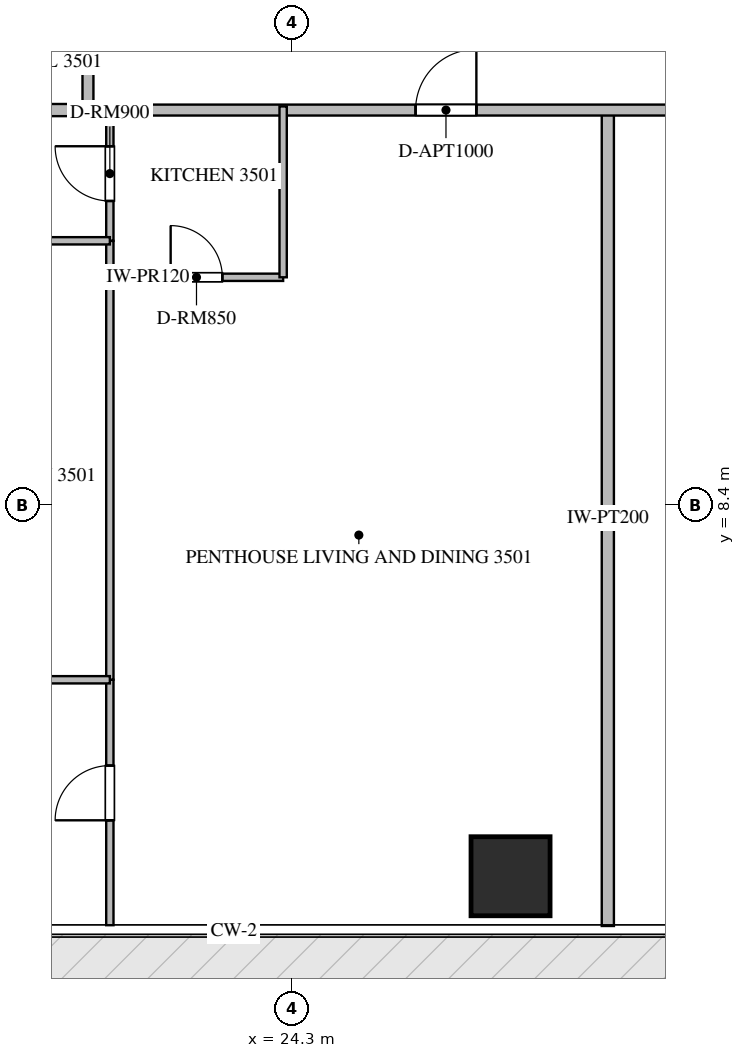
"""IFC4 building model, lengths in metres.
Left out: names, types, materials, properties, quantities, classifications, styles, units other than length and angle.
Written with IfcOpenShell. Run it as: python <this file> out.ifc"""

import sys

from ifc_helpers import new_model, si_unit, direction, frame, frame_2d, origin, origin_2d, place, context, subcontext, project, spatial, rectangle, extrude, source, transform, mapped, element, fill, save


model = new_model("IFC4")
c1 = context("Model", 3, precision=1e-05, world=origin(), true_north=direction((0.0, 1.0)))
c2 = subcontext(c1, "Body", "Model", "MODEL_VIEW")
j1 = project(units=[si_unit("LENGTHUNIT", "METRE"), si_unit("PLANEANGLEUNIT", "RADIAN")], contexts=[c1])
p1 = place(None, origin())
s1 = spatial("IfcSite", under=j1, at=p1, CompositionType="ELEMENT")
p2 = place(p1, origin())
s2 = spatial("IfcBuilding", under=s1, at=p2, CompositionType="ELEMENT")
p3 = place(p2, frame((0.0, 0.0, 142.65)))
s3 = spatial("IfcBuildingStorey", under=s2, at=p3, CompositionType="ELEMENT", Elevation=142.65)
m1 = source(origin(), c2, "Body", "SweptSolid", [
    extrude(rectangle(XDim=1.3, YDim=1.3, at=origin_2d()), origin(), (0.0, 0.0, 1.0), 3.75),
])
p4 = place(p3, frame((27.9, 2.3, -0.26), z_axis=(0.0, 0.0, 1.0), x_axis=(1.0, 0.0, 0.0)))
e1 = element("IfcColumn", 1, at=p4, inside=s3, PredefinedType="COLUMN", context=c2, shape_type="MappedRepresentation", body=[
    mapped(m1, transform((0.0, 0.0, 0.0), scale=1.0)),
])
p5 = place(p3, frame((29.5, 1.482, 0.0), z_axis=(0.0, 0.0, 1.0), x_axis=(0.0, 1.0, 0.0)))
e2 = element("IfcWall", 2, at=p5, inside=s3, PredefinedType="PARTITIONING", context=c2, shape_type="SweptSolid", body=[
    extrude(rectangle(XDim=13.418, YDim=0.2, at=frame_2d((6.709, 0.0))), origin(), (0.0, 0.0, 1.0), 3.49),
])
p6 = place(p3, frame((7.882, 14.9, 0.0), z_axis=(0.0, 0.0, 1.0), x_axis=(1.0, 0.0, 0.0)))
e3 = element("IfcWall", 3, at=p6, inside=s3, PredefinedType="PARTITIONING", context=c2, shape_type="SweptSolid", body=[
    extrude(rectangle(XDim=13.068, YDim=0.2, at=frame_2d((6.534, 0.0))), origin(), (0.0, 0.0, 1.0), 3.49),
])
p7 = place(p3, frame((20.952, 14.9, 0.0), z_axis=(0.0, 0.0, 1.0), x_axis=(1.0, 0.0, 0.0)))
e4 = element("IfcWall", 4, at=p7, inside=s3, PredefinedType="PARTITIONING", context=c2, shape_type="SweptSolid", body=[
    extrude(rectangle(XDim=22.896, YDim=0.18, at=frame_2d((11.448, 0.0))), origin(), (0.0, 0.0, 1.0), 3.49),
])
p8 = place(p7, frame((5.386, 0.0, 0.0)))
e5 = element("IfcOpeningElement", 5, at=p8, cuts=e4, PredefinedType="OPENING", context=c2, shape_type="SweptSolid", body=[
    extrude(rectangle(XDim=1.0, YDim=2.15, at=frame_2d((0.5, 1.075))), frame((0.0, 0.1, 0.0), z_axis=(0.0, -1.0, 0.0), x_axis=(1.0, 0.0, 0.0)), (0.0, 0.0, 1.0), 0.2),
])
p9 = place(p7, frame((10.948, 0.0, 0.0)))
e6 = element("IfcOpeningElement", 6, at=p9, cuts=e4, PredefinedType="OPENING", context=c2, shape_type="SweptSolid", body=[
    extrude(rectangle(XDim=1.0, YDim=2.15, at=frame_2d((0.5, 1.075))), frame((0.0, 0.1, 0.0), z_axis=(0.0, -1.0, 0.0), x_axis=(1.0, 0.0, 0.0)), (0.0, 0.0, 1.0), 0.2),
])
p10 = place(p3, frame((20.95, 14.9, 0.0), z_axis=(0.0, 0.0, 1.0), x_axis=(0.0, 1.0, 0.0)))
e7 = element("IfcWall", 7, at=p10, inside=s3, PredefinedType="PARTITIONING", context=c2, shape_type="SweptSolid", body=[
    extrude(rectangle(XDim=18.7, YDim=0.18, at=frame_2d((9.35, 0.0))), origin(), (0.0, 0.0, 1.0), 3.49),
])
p11 = place(p10, frame((5.328, 0.0, 0.0)))
e8 = element("IfcOpeningElement", 8, at=p11, cuts=e7, PredefinedType="OPENING", context=c2, shape_type="SweptSolid", body=[
    extrude(rectangle(XDim=1.0, YDim=2.15, at=frame_2d((0.5, 1.075))), frame((0.0, 0.1, 0.0), z_axis=(0.0, -1.0, 0.0), x_axis=(1.0, 0.0, 0.0)), (0.0, 0.0, 1.0), 0.2),
])
p12 = place(p10, frame((15.257, 0.0, 0.0)))
e9 = element("IfcOpeningElement", 9, at=p12, cuts=e7, PredefinedType="OPENING", context=c2, shape_type="SweptSolid", body=[
    extrude(rectangle(XDim=1.0, YDim=2.15, at=frame_2d((0.5, 1.075))), frame((0.0, 0.1, 0.0), z_axis=(0.0, -1.0, 0.0), x_axis=(1.0, 0.0, 0.0)), (0.0, 0.0, 1.0), 0.2),
])
p13 = place(p3, frame((21.31, 12.15, 0.0), z_axis=(0.0, 0.0, 1.0), x_axis=(1.0, 0.0, 0.0)))
e10 = element("IfcWall", 10, at=p13, inside=s3, PredefinedType="PARTITIONING", context=c2, shape_type="SweptSolid", body=[
    extrude(rectangle(XDim=2.85, YDim=0.12, at=frame_2d((1.425, 0.0))), origin(), (0.0, 0.0, 1.0), 3.49),
])
p14 = place(p13, frame((1.0, 0.0, 0.0)))
e11 = element("IfcOpeningElement", 11, at=p14, cuts=e10, PredefinedType="OPENING", context=c2, shape_type="SweptSolid", body=[
    extrude(rectangle(XDim=0.85, YDim=2.1, at=frame_2d((0.425, 1.05))), frame((0.0, 0.07, 0.0), z_axis=(0.0, -1.0, 0.0), x_axis=(1.0, 0.0, 0.0)), (0.0, 0.0, 1.0), 0.14),
])
p15 = place(p3, frame((24.16, 12.15, 0.0), z_axis=(0.0, 0.0, 1.0), x_axis=(0.0, 1.0, 0.0)))
e12 = element("IfcWall", 12, at=p15, inside=s3, PredefinedType="PARTITIONING", context=c2, shape_type="SweptSolid", body=[
    extrude(rectangle(XDim=2.81, YDim=0.12, at=frame_2d((1.405, 0.0))), origin(), (0.0, 0.0, 1.0), 3.49),
])
p16 = place(p3, frame((21.31, 12.75, 0.0), z_axis=(0.0, 0.0, 1.0), x_axis=(0.0, 1.0, 0.0)))
e13 = element("IfcWall", 13, at=p16, inside=s3, PredefinedType="PARTITIONING", context=c2, shape_type="SweptSolid", body=[
    extrude(rectangle(XDim=2.21, YDim=0.12, at=frame_2d((1.105, 0.0))), origin(), (0.0, 0.0, 1.0), 3.49),
])
p17 = place(p16, frame((0.655, 0.0, 0.0)))
e14 = element("IfcOpeningElement", 14, at=p17, cuts=e13, PredefinedType="OPENING", context=c2, shape_type="SweptSolid", body=[
    extrude(rectangle(XDim=0.9, YDim=2.1, at=frame_2d((0.45, 1.05))), frame((0.0, 0.07, 0.0), z_axis=(0.0, -1.0, 0.0), x_axis=(1.0, 0.0, 0.0)), (0.0, 0.0, 1.0), 0.14),
])
p18 = place(p3, frame((21.31, 1.495, 0.0), z_axis=(0.0, 0.0, 1.0), x_axis=(0.0, 1.0, 0.0)))
e15 = element("IfcWall", 15, at=p18, inside=s3, PredefinedType="PARTITIONING", context=c2, shape_type="SweptSolid", body=[
    extrude(rectangle(XDim=4.036, YDim=0.12, at=frame_2d((2.018, 0.0))), origin(), (0.0, 0.0, 1.0), 3.49),
])
p19 = place(p18, frame((1.725, 0.0, 0.0)))
e16 = element("IfcOpeningElement", 16, at=p19, cuts=e15, PredefinedType="OPENING", context=c2, shape_type="SweptSolid", body=[
    extrude(rectangle(XDim=0.9, YDim=2.1, at=frame_2d((0.45, 1.05))), frame((0.0, 0.07, 0.0), z_axis=(0.0, -1.0, 0.0), x_axis=(1.0, 0.0, 0.0)), (0.0, 0.0, 1.0), 0.14),
])
p20 = place(p3, frame((21.31, 5.533, 0.0), z_axis=(0.0, 0.0, 1.0), x_axis=(0.0, 1.0, 0.0)))
e17 = element("IfcWall", 17, at=p20, inside=s3, PredefinedType="PARTITIONING", context=c2, shape_type="SweptSolid", body=[
    extrude(rectangle(XDim=7.215, YDim=0.12, at=frame_2d((3.607, 0.0))), origin(), (0.0, 0.0, 1.0), 3.49),
])
p21 = place(p3, frame((16.25, 5.531, 0.0), z_axis=(0.0, 0.0, 1.0), x_axis=(1.0, 0.0, 0.0)))
e18 = element("IfcWall", 18, at=p21, inside=s3, PredefinedType="PARTITIONING", context=c2, shape_type="SweptSolid", body=[
    extrude(rectangle(XDim=5.06, YDim=0.12, at=frame_2d((2.53, 0.0))), origin(), (0.0, 0.0, 1.0), 3.49),
])
p22 = place(p3, frame((18.352, 12.75, 0.0), z_axis=(0.0, 0.0, 1.0), x_axis=(1.0, 0.0, 0.0)))
e19 = element("IfcWall", 19, at=p22, inside=s3, PredefinedType="PARTITIONING", context=c2, shape_type="SweptSolid", body=[
    extrude(rectangle(XDim=2.958, YDim=0.12, at=frame_2d((1.479, 0.0))), origin(), (0.0, 0.0, 1.0), 3.49),
])
p23 = place(p22, frame((1.054, 0.0, 0.0)))
e20 = element("IfcOpeningElement", 20, at=p23, cuts=e19, PredefinedType="OPENING", context=c2, shape_type="SweptSolid", body=[
    extrude(rectangle(XDim=0.85, YDim=2.1, at=frame_2d((0.425, 1.05))), frame((0.0, 0.07, 0.0), z_axis=(0.0, -1.0, 0.0), x_axis=(1.0, 0.0, 0.0)), (0.0, 0.0, 1.0), 0.14),
])
m2 = source(origin(), c2, "Body", "SweptSolid", [
    extrude(rectangle(XDim=1.0, YDim=2.15, at=frame_2d((0.5, 1.075))), frame((0.0, 0.025, 0.0), z_axis=(0.0, -1.0, 0.0), x_axis=(1.0, 0.0, 0.0)), (0.0, 0.0, 1.0), 0.05),
])
p24 = place(p8, origin())
e21 = element("IfcDoor", 21, at=p24, inside=s3, OperationType="SINGLE_SWING_RIGHT", PredefinedType="DOOR", context=c2, shape_type="MappedRepresentation", body=[
    mapped(m2, transform((0.0, 0.0, 0.0), scale=1.0)),
])
fill(e5, e21)
m3 = source(origin(), c2, "Body", "SweptSolid", [
    extrude(rectangle(XDim=0.85, YDim=2.1, at=frame_2d((0.425, 1.05))), frame((0.0, 0.025, 0.0), z_axis=(0.0, -1.0, 0.0), x_axis=(1.0, 0.0, 0.0)), (0.0, 0.0, 1.0), 0.05),
])
p25 = place(p14, origin())
e22 = element("IfcDoor", 22, at=p25, inside=s3, OperationType="SINGLE_SWING_LEFT", PredefinedType="DOOR", context=c2, shape_type="MappedRepresentation", body=[
    mapped(m3, transform((0.0, 0.0, 0.0), scale=1.0)),
])
fill(e11, e22)
m4 = source(origin(), c2, "Body", "SweptSolid", [
    extrude(rectangle(XDim=0.9, YDim=2.1, at=frame_2d((0.45, 1.05))), frame((0.0, 0.025, 0.0), z_axis=(0.0, -1.0, 0.0), x_axis=(1.0, 0.0, 0.0)), (0.0, 0.0, 1.0), 0.05),
])
p26 = place(p17, origin())
e23 = element("IfcDoor", 23, at=p26, inside=s3, OperationType="SINGLE_SWING_RIGHT", PredefinedType="DOOR", context=c2, shape_type="MappedRepresentation", body=[
    mapped(m4, transform((0.0, 0.0, 0.0), scale=1.0)),
])
fill(e14, e23)
p27 = place(p19, origin())
e24 = element("IfcDoor", 24, at=p27, inside=s3, OperationType="SINGLE_SWING_LEFT", PredefinedType="DOOR", context=c2, shape_type="MappedRepresentation", body=[
    mapped(m4, transform((0.0, 0.0, 0.0), scale=1.0)),
])
fill(e16, e24)
save(model, sys.argv[1])
